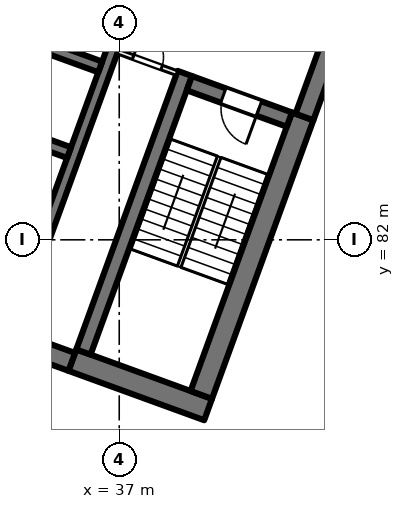
"""IFC4 building model, lengths in metres.
Left out: names, types, materials, properties, quantities, classifications, styles, units other than length and angle.
Written with IfcOpenShell. Run it as: python <this file> out.ifc"""

import sys

from ifc_helpers import new_model, si_unit, direction, frame, frame_2d, origin, place, context, subcontext, project, spatial, rectangle, extrude, element, fill, save


model = new_model("IFC4")
c1 = context("Model", 3, precision=1e-05, world=origin(), true_north=direction((0.0, 1.0)))
c2 = subcontext(c1, "Body", "Model", "MODEL_VIEW")
j1 = project(units=[si_unit("LENGTHUNIT", "METRE"), si_unit("PLANEANGLEUNIT", "RADIAN")], contexts=[c1])
p1 = place(None, origin())
s1 = spatial("IfcSite", under=j1, at=p1, CompositionType="ELEMENT")
p2 = place(p1, origin())
s2 = spatial("IfcBuilding", under=s1, at=p2, CompositionType="ELEMENT")
p3 = place(p2, frame((0.0, 0.0, 204.0)))
s3 = spatial("IfcBuildingStorey", under=s2, at=p3, CompositionType="ELEMENT", Elevation=204.0)
p4 = place(p3, frame((39.338, 77.535, 0.0), z_axis=(0.0, 0.0, 1.0), x_axis=(-0.939701471648, 0.341995824804, 0.0)))
e1 = element("IfcWall", 1, at=p4, inside=s3, PredefinedType="SHEAR", context=c2, shape_type="SweptSolid", body=[
    extrude(rectangle(XDim=3.8, YDim=0.6, at=frame_2d((1.9, 0.0))), origin(), (0.0, 0.0, 1.0), 4.0),
])
p5 = place(p3, frame((35.75, 78.788, 0.0), z_axis=(0.0, 0.0, 1.0), x_axis=(-0.939692894512, 0.342019391267, 0.0)))
e2 = element("IfcWall", 2, at=p5, inside=s3, PredefinedType="SHEAR", context=c2, shape_type="SweptSolid", body=[
    extrude(rectangle(XDim=14.4, YDim=0.5, at=frame_2d((7.2, 0.0))), origin(), (0.0, 0.0, 1.0), 4.0),
])
p6 = place(p3, frame((39.159, 77.92, 0.0), z_axis=(0.0, 0.0, 1.0), x_axis=(0.342016982193, 0.939693771338, 0.0)))
e3 = element("IfcWall", 3, at=p6, inside=s3, PredefinedType="SHEAR", context=c2, shape_type="SweptSolid", body=[
    extrude(rectangle(XDim=7.8, YDim=0.6, at=frame_2d((3.9, 0.0))), origin(), (0.0, 0.0, 1.0), 4.0),
])
p7 = place(p3, frame((41.874, 85.232, 0.0), z_axis=(0.0, 0.0, 1.0), x_axis=(0.342020437038, 0.939692513883, 0.0)))
e4 = element("IfcWall", 4, at=p7, inside=s3, PredefinedType="SHEAR", context=c2, shape_type="SweptSolid", body=[
    extrude(rectangle(XDim=8.975, YDim=0.5, at=frame_2d((4.487, 0.0))), origin(), (0.0, 0.0, 1.0), 4.0),
])
p8 = place(p3, frame((36.058, 79.048, 0.0), z_axis=(0.0, 0.0, 1.0), x_axis=(0.342016982193, 0.939693771338, 0.0)))
e5 = element("IfcWall", 5, at=p8, inside=s3, PredefinedType="SHEAR", context=c2, shape_type="SweptSolid", body=[
    extrude(rectangle(XDim=7.8, YDim=0.4, at=frame_2d((3.9, 0.0))), origin(), (0.0, 0.0, 1.0), 4.0),
])
p9 = place(p3, frame((41.476, 85.164, 0.0), z_axis=(0.0, 0.0, 1.0), x_axis=(-0.939678810556, 0.342058084236, 0.0)))
e6 = element("IfcWall", 6, at=p9, inside=s3, PredefinedType="SHEAR", context=c2, shape_type="SweptSolid", body=[
    extrude(rectangle(XDim=2.8, YDim=0.4, at=frame_2d((1.4, 0.0))), origin(), (0.0, 0.0, 1.0), 4.0),
])
p10 = place(p9, frame((0.85, 0.0, 0.0)))
e7 = element("IfcOpeningElement", 7, at=p10, cuts=e6, PredefinedType="OPENING", context=c2, shape_type="SweptSolid", body=[
    extrude(rectangle(XDim=1.0, YDim=2.1, at=frame_2d((0.5, 1.05))), frame((0.0, 0.21, 0.0), z_axis=(0.0, -1.0, 0.0), x_axis=(1.0, 0.0, 0.0)), (0.0, 0.0, 1.0), 0.42),
])
p11 = place(p3, frame((30.949, 80.801, 0.0), z_axis=(0.0, 0.0, 1.0), x_axis=(0.342016684409, 0.939693879721, 0.0)))
e8 = element("IfcWall", 8, at=p11, inside=s3, PredefinedType="SHEAR", context=c2, shape_type="SweptSolid", body=[
    extrude(rectangle(XDim=12.25, YDim=0.3, at=frame_2d((6.125, 0.0))), origin(), (0.0, 0.0, 1.0), 4.0),
])
p12 = place(p11, frame((0.9, 0.0, 0.0)))
e9 = element("IfcOpeningElement", 9, at=p12, cuts=e8, PredefinedType="OPENING", context=c2, shape_type="SweptSolid", body=[
    extrude(rectangle(XDim=0.8, YDim=2.1, at=frame_2d((0.4, 1.05))), frame((0.0, 0.16, 0.0), z_axis=(0.0, -1.0, 0.0), x_axis=(1.0, 0.0, 0.0)), (0.0, 0.0, 1.0), 0.32),
])
p13 = place(p11, frame((5.7, 0.0, 0.0)))
e10 = element("IfcOpeningElement", 10, at=p13, cuts=e8, PredefinedType="OPENING", context=c2, shape_type="SweptSolid", body=[
    extrude(rectangle(XDim=0.8, YDim=2.1, at=frame_2d((0.4, 1.05))), frame((0.0, 0.16, 0.0), z_axis=(0.0, -1.0, 0.0), x_axis=(1.0, 0.0, 0.0)), (0.0, 0.0, 1.0), 0.32),
])
p14 = place(p3, frame((34.144, 79.638, 0.0), z_axis=(0.0, 0.0, 1.0), x_axis=(0.342016684409, 0.939693879721, 0.0)))
e11 = element("IfcWall", 11, at=p14, inside=s3, PredefinedType="SHEAR", context=c2, shape_type="SweptSolid", body=[
    extrude(rectangle(XDim=12.25, YDim=0.3, at=frame_2d((6.125, 0.0))), origin(), (0.0, 0.0, 1.0), 4.0),
])
p15 = place(p3, frame((35.679, 84.294, 0.0), z_axis=(0.0, 0.0, 1.0), x_axis=(-0.939706007505, 0.341983361377, 0.0)))
e12 = element("IfcWall", 12, at=p15, inside=s3, PredefinedType="SHEAR", context=c2, shape_type="SweptSolid", body=[
    extrude(rectangle(XDim=3.1, YDim=0.3, at=frame_2d((1.55, 0.0))), origin(), (0.0, 0.0, 1.0), 4.0),
])
p16 = place(p3, frame((36.5, 86.549, 0.0), z_axis=(0.0, 0.0, 1.0), x_axis=(-0.939689908313, 0.342027595692, 0.0)))
e13 = element("IfcWall", 13, at=p16, inside=s3, PredefinedType="SHEAR", context=c2, shape_type="SweptSolid", body=[
    extrude(rectangle(XDim=3.1, YDim=0.3, at=frame_2d((1.55, 0.0))), origin(), (0.0, 0.0, 1.0), 4.0),
])
p17 = place(p3, frame((36.966, 86.952, 0.0), z_axis=(0.0, 0.0, 1.0), x_axis=(0.939672407396, -0.342075674051, 0.0)))
e14 = element("IfcWall", 14, at=p17, inside=s3, PredefinedType="PARTITIONING", context=c2, shape_type="SweptSolid", body=[
    extrude(rectangle(XDim=1.65, YDim=0.125, at=frame_2d((0.825, 0.0))), origin(), (0.0, 0.0, 1.0), 3.625),
])
p18 = place(p17, frame((0.425, 0.0, 0.0)))
e15 = element("IfcOpeningElement", 15, at=p18, cuts=e14, PredefinedType="OPENING", context=c2, shape_type="SweptSolid", body=[
    extrude(rectangle(XDim=0.8, YDim=2.1, at=frame_2d((0.4, 1.05))), frame((0.0, 0.073, 0.0), z_axis=(0.0, -1.0, 0.0), x_axis=(1.0, 0.0, 0.0)), (0.0, 0.0, 1.0), 0.145),
])
p19 = place(p10, origin())
e16 = element("IfcDoor", 16, at=p19, inside=s3, OperationType="SINGLE_SWING_RIGHT", PredefinedType="DOOR", context=c2, shape_type="SweptSolid", body=[
    extrude(rectangle(XDim=1.0, YDim=2.1, at=frame_2d((0.5, 1.05))), frame((0.0, 0.025, 0.0), z_axis=(0.0, -1.0, 0.0), x_axis=(1.0, 0.0, 0.0)), (0.0, 0.0, 1.0), 0.05),
])
fill(e7, e16)
p20 = place(p18, origin())
e17 = element("IfcDoor", 17, at=p20, inside=s3, OperationType="SINGLE_SWING_LEFT", PredefinedType="DOOR", context=c2, shape_type="SweptSolid", body=[
    extrude(rectangle(XDim=0.8, YDim=2.1, at=frame_2d((0.4, 1.05))), frame((0.0, 0.025, 0.0), z_axis=(0.0, -1.0, 0.0), x_axis=(1.0, 0.0, 0.0)), (0.0, 0.0, 1.0), 0.05),
])
fill(e15, e17)
save(model, sys.argv[1])
